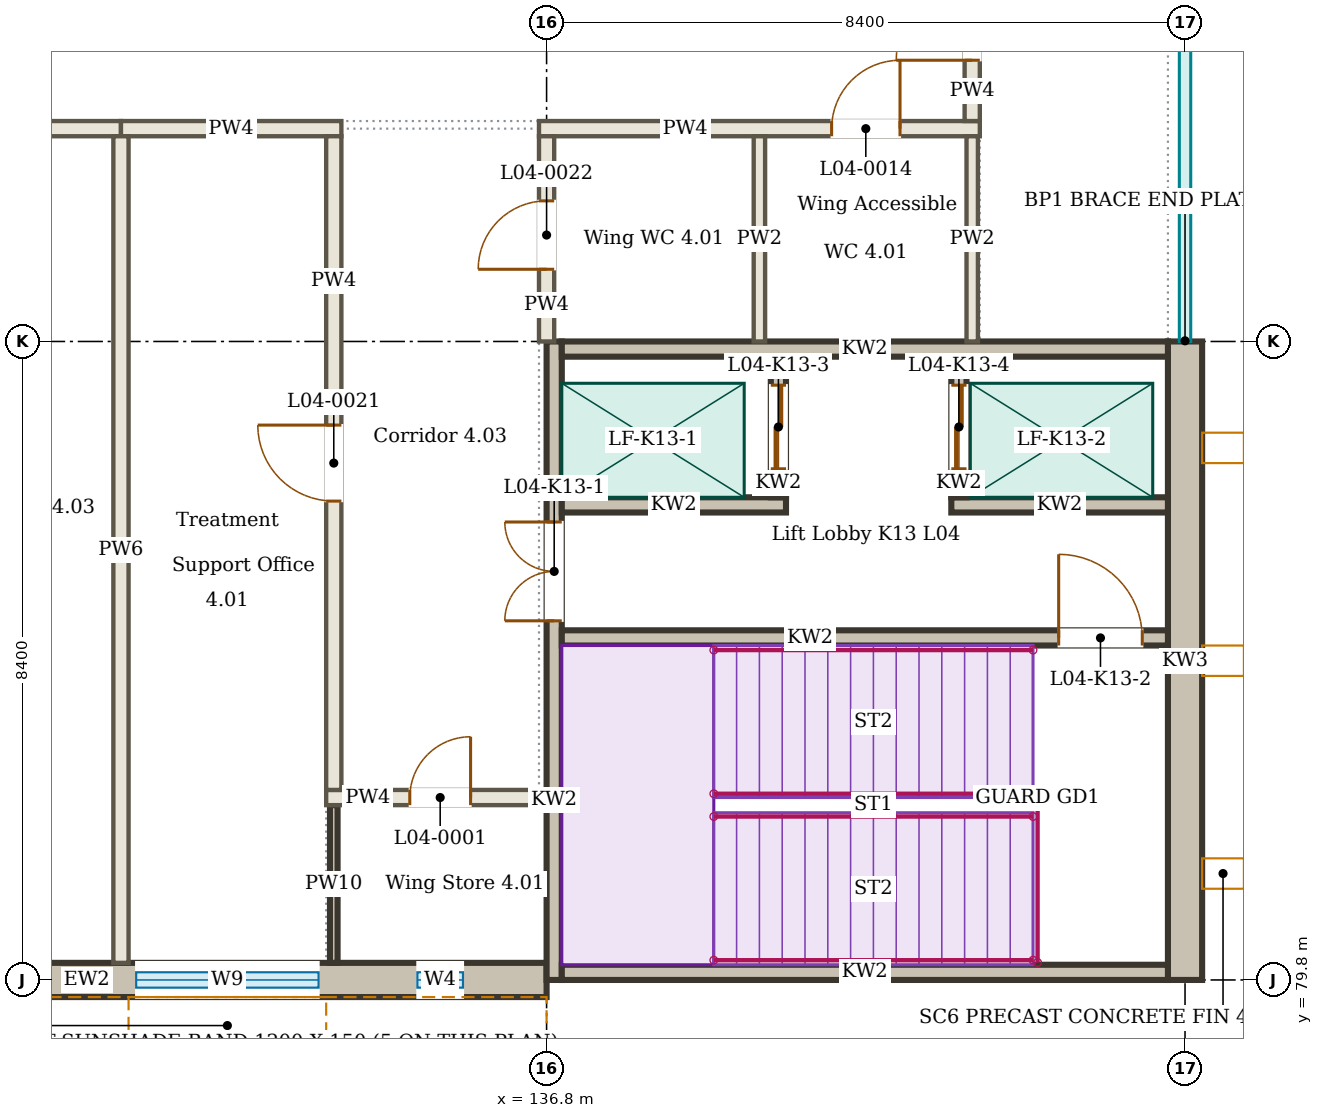
"""IFC4 building model, lengths in metres.
Left out: names, types, materials, properties, quantities, classifications, styles, units other than length and angle.
Written with IfcOpenShell. Run it as: python <this file> out.ifc"""

import sys

from ifc_helpers import new_model, si_unit, direction, frame, frame_2d, origin, place, context, subcontext, project, spatial, rectangle, extrude, element, fill, save


model = new_model("IFC4")
c1 = context("Model", 3, precision=1e-05, world=origin(), true_north=direction((0.0, 1.0)))
c2 = subcontext(c1, "Body", "Model", "MODEL_VIEW")
j1 = project(units=[si_unit("LENGTHUNIT", "METRE"), si_unit("PLANEANGLEUNIT", "RADIAN")], contexts=[c1])
p1 = place(None, origin())
s1 = spatial("IfcSite", under=j1, at=p1, CompositionType="ELEMENT")
p2 = place(p1, origin())
s2 = spatial("IfcBuilding", under=s1, at=p2, CompositionType="ELEMENT")
p3 = place(p2, frame((0.0, 0.0, 18.0)))
s3 = spatial("IfcBuildingStorey", under=s2, at=p3, CompositionType="ELEMENT", Elevation=18.0)
p4 = place(p3, frame((128.597, 79.8, 0.0), z_axis=(0.0, 0.0, 1.0), x_axis=(1.0, 0.0, 0.0)))
e1 = element("IfcWall", 1, at=p4, inside=s3, PredefinedType="SOLIDWALL", context=c2, shape_type="SweptSolid", body=[
    extrude(rectangle(XDim=8.203, YDim=0.45, at=frame_2d((4.101, 0.0))), origin(), (0.0, 0.0, 1.0), 3.8),
])
p5 = place(p4, frame((0.903, 0.0, 2.1)))
e2 = element("IfcOpeningElement", 2, at=p5, cuts=e1, PredefinedType="OPENING", context=c2, shape_type="SweptSolid", body=[
    extrude(rectangle(XDim=0.6, YDim=1.2, at=frame_2d((0.3, 0.6))), frame((0.0, 0.235, 0.0), z_axis=(0.0, -1.0, 0.0), x_axis=(1.0, 0.0, 0.0)), (0.0, 0.0, 1.0), 0.47),
])
p6 = place(p4, frame((2.802, 0.0, 0.9)))
e3 = element("IfcOpeningElement", 3, at=p6, cuts=e1, PredefinedType="OPENING", context=c2, shape_type="SweptSolid", body=[
    extrude(rectangle(XDim=2.4, YDim=1.2, at=frame_2d((1.2, 0.6))), frame((0.0, 0.235, 0.0), z_axis=(0.0, -1.0, 0.0), x_axis=(1.0, 0.0, 0.0)), (0.0, 0.0, 1.0), 0.47),
])
p7 = place(p4, frame((6.502, 0.0, 2.1)))
e4 = element("IfcOpeningElement", 4, at=p7, cuts=e1, PredefinedType="OPENING", context=c2, shape_type="SweptSolid", body=[
    extrude(rectangle(XDim=0.6, YDim=1.2, at=frame_2d((0.3, 0.6))), frame((0.0, 0.235, 0.0), z_axis=(0.0, -1.0, 0.0), x_axis=(1.0, 0.0, 0.0)), (0.0, 0.0, 1.0), 0.47),
])
p8 = place(p3, frame((128.597, 79.64, 3.82), z_axis=(0.0, 0.0, 1.0), x_axis=(1.0, 0.0, 0.0)))
e5 = element("IfcWall", 5, at=p8, inside=s3, PredefinedType="SOLIDWALL", context=c2, shape_type="SweptSolid", body=[
    extrude(rectangle(XDim=8.203, YDim=0.13, at=frame_2d((4.101, 0.0))), origin(), (0.0, 0.0, 1.0), 0.68),
])
p9 = place(p3, frame((133.9, 82.2, 0.0), z_axis=(0.0, 0.0, 1.0), x_axis=(1.0, 0.0, 0.0)))
e6 = element("IfcWall", 6, at=p9, inside=s3, PredefinedType="PARTITIONING", context=c2, shape_type="SweptSolid", body=[
    extrude(rectangle(XDim=2.9, YDim=0.2, at=frame_2d((1.45, 0.0))), origin(), (0.0, 0.0, 1.0), 3.894),
])
p10 = place(p9, frame((1.1, 0.0, 0.0)))
e7 = element("IfcOpeningElement", 7, at=p10, cuts=e6, PredefinedType="OPENING", context=c2, shape_type="SweptSolid", body=[
    extrude(rectangle(XDim=0.8, YDim=2.1, at=frame_2d((0.4, 1.05))), frame((0.0, 0.11, 0.0), z_axis=(0.0, -1.0, 0.0), x_axis=(1.0, 0.0, 0.0)), (0.0, 0.0, 1.0), 0.22),
])
p11 = place(p3, frame((111.825, 91.0, 0.0), z_axis=(0.0, 0.0, 1.0), x_axis=(1.0, 0.0, 0.0)))
e8 = element("IfcWall", 8, at=p11, inside=s3, PredefinedType="PARTITIONING", context=c2, shape_type="SweptSolid", body=[
    extrude(rectangle(XDim=19.375, YDim=0.2, at=frame_2d((9.688, 0.0))), origin(), (0.0, 0.0, 1.0), 3.75),
])
p12 = place(p11, frame((3.375, 0.0, 0.0)))
e9 = element("IfcOpeningElement", 9, at=p12, cuts=e8, PredefinedType="OPENING", context=c2, shape_type="SweptSolid", body=[
    extrude(rectangle(XDim=1.2, YDim=2.1, at=frame_2d((0.6, 1.05))), frame((0.0, 0.11, 0.0), z_axis=(0.0, -1.0, 0.0), x_axis=(1.0, 0.0, 0.0)), (0.0, 0.0, 1.0), 0.22),
])
p13 = place(p11, frame((10.375, 0.0, 0.0)))
e10 = element("IfcOpeningElement", 10, at=p13, cuts=e8, PredefinedType="OPENING", context=c2, shape_type="SweptSolid", body=[
    extrude(rectangle(XDim=1.2, YDim=2.1, at=frame_2d((0.6, 1.05))), frame((0.0, 0.11, 0.0), z_axis=(0.0, -1.0, 0.0), x_axis=(1.0, 0.0, 0.0)), (0.0, 0.0, 1.0), 0.22),
])
p14 = place(p11, frame((15.975, 0.0, 0.0)))
e11 = element("IfcOpeningElement", 11, at=p14, cuts=e8, PredefinedType="OPENING", context=c2, shape_type="SweptSolid", body=[
    extrude(rectangle(XDim=1.2, YDim=2.1, at=frame_2d((0.6, 1.05))), frame((0.0, 0.11, 0.0), z_axis=(0.0, -1.0, 0.0), x_axis=(1.0, 0.0, 0.0)), (0.0, 0.0, 1.0), 0.22),
])
p15 = place(p3, frame((131.2, 91.0, 0.0), z_axis=(0.0, 0.0, 1.0), x_axis=(1.0, 0.0, 0.0)))
e12 = element("IfcWall", 12, at=p15, inside=s3, PredefinedType="PARTITIONING", context=c2, shape_type="SweptSolid", body=[
    extrude(rectangle(XDim=2.9, YDim=0.2, at=frame_2d((1.45, 0.0))), origin(), (0.0, 0.0, 1.0), 3.894),
])
p16 = place(p3, frame((136.7, 91.0, 0.0), z_axis=(0.0, 0.0, 1.0), x_axis=(1.0, 0.0, 0.0)))
e13 = element("IfcWall", 13, at=p16, inside=s3, PredefinedType="PARTITIONING", context=c2, shape_type="SweptSolid", body=[
    extrude(rectangle(XDim=5.8, YDim=0.2, at=frame_2d((2.9, 0.0))), origin(), (0.0, 0.0, 1.0), 3.75),
])
p17 = place(p16, frame((3.85, 0.0, 0.0)))
e14 = element("IfcOpeningElement", 14, at=p17, cuts=e13, PredefinedType="OPENING", context=c2, shape_type="SweptSolid", body=[
    extrude(rectangle(XDim=0.9, YDim=2.1, at=frame_2d((0.45, 1.05))), frame((0.0, 0.11, 0.0), z_axis=(0.0, -1.0, 0.0), x_axis=(1.0, 0.0, 0.0)), (0.0, 0.0, 1.0), 0.22),
])
p18 = place(p3, frame((131.2, 80.025, 0.0), z_axis=(0.0, 0.0, 1.0), x_axis=(0.0, 1.0, 0.0)))
e15 = element("IfcWall", 15, at=p18, inside=s3, PredefinedType="PARTITIONING", context=c2, shape_type="SweptSolid", body=[
    extrude(rectangle(XDim=10.875, YDim=0.2, at=frame_2d((5.438, 0.0))), origin(), (0.0, 0.0, 1.0), 3.75),
])
p19 = place(p3, frame((134.0, 80.025, 0.0), z_axis=(0.0, 0.0, 1.0), x_axis=(0.0, 1.0, 0.0)))
e16 = element("IfcWall", 16, at=p19, inside=s3, PredefinedType="SOLIDWALL", context=c2, shape_type="SweptSolid", body=[
    extrude(rectangle(XDim=2.075, YDim=0.1, at=frame_2d((1.038, 0.0))), origin(), (0.0, 0.0, 1.0), 3.894),
])
p20 = place(p3, frame((134.0, 82.3, 0.0), z_axis=(0.0, 0.0, 1.0), x_axis=(0.0, 1.0, 0.0)))
e17 = element("IfcWall", 17, at=p20, inside=s3, PredefinedType="PARTITIONING", context=c2, shape_type="SweptSolid", body=[
    extrude(rectangle(XDim=8.6, YDim=0.2, at=frame_2d((4.3, 0.0))), origin(), (0.0, 0.0, 1.0), 3.75),
])
p21 = place(p20, frame((3.8, 0.0, 0.0)))
e18 = element("IfcOpeningElement", 18, at=p21, cuts=e17, PredefinedType="OPENING", context=c2, shape_type="SweptSolid", body=[
    extrude(rectangle(XDim=1.0, YDim=2.1, at=frame_2d((0.5, 1.05))), frame((0.0, 0.11, 0.0), z_axis=(0.0, -1.0, 0.0), x_axis=(1.0, 0.0, 0.0)), (0.0, 0.0, 1.0), 0.22),
])
p22 = place(p3, frame((136.8, 88.2, 0.0), z_axis=(0.0, 0.0, 1.0), x_axis=(0.0, 1.0, 0.0)))
e19 = element("IfcWall", 19, at=p22, inside=s3, PredefinedType="PARTITIONING", context=c2, shape_type="SweptSolid", body=[
    extrude(rectangle(XDim=2.7, YDim=0.2, at=frame_2d((1.35, 0.0))), origin(), (0.0, 0.0, 1.0), 3.75),
])
p23 = place(p22, frame((0.95, 0.0, 0.0)))
e20 = element("IfcOpeningElement", 20, at=p23, cuts=e19, PredefinedType="OPENING", context=c2, shape_type="SweptSolid", body=[
    extrude(rectangle(XDim=0.9, YDim=2.1, at=frame_2d((0.45, 1.05))), frame((0.0, 0.11, 0.0), z_axis=(0.0, -1.0, 0.0), x_axis=(1.0, 0.0, 0.0)), (0.0, 0.0, 1.0), 0.22),
])
for number, where, z_axis, x_axis in (
    (21, (139.6, 88.2, 0.0), (0.0, 0.0, 1.0), (0.0, 1.0, 0.0)),
    (22, (142.4, 88.2, 0.0), (0.0, 0.0, 1.0), (0.0, 1.0, 0.0)),
):
    element("IfcWall", number, at=place(p3, frame(where, z_axis=z_axis, x_axis=x_axis)), inside=s3, PredefinedType="PARTITIONING", context=c2, shape_type="SweptSolid", body=[
        extrude(rectangle(XDim=2.7, YDim=0.15, at=frame_2d((1.35, 0.0))), origin(), (0.0, 0.0, 1.0), 3.894),
    ])
p24 = place(p3, frame((142.4, 91.1, 0.0), z_axis=(0.0, 0.0, 1.0), x_axis=(0.0, 1.0, 0.0)))
e23 = element("IfcWall", 23, at=p24, inside=s3, PredefinedType="PARTITIONING", context=c2, shape_type="SweptSolid", body=[
    extrude(rectangle(XDim=2.6, YDim=0.2, at=frame_2d((1.3, 0.0))), origin(), (0.0, 0.0, 1.0), 3.894),
])
p25 = place(p24, frame((0.8, 0.0, 0.0)))
e24 = element("IfcOpeningElement", 24, at=p25, cuts=e23, PredefinedType="OPENING", context=c2, shape_type="SweptSolid", body=[
    extrude(rectangle(XDim=1.0, YDim=2.1, at=frame_2d((0.5, 1.05))), frame((0.0, 0.11, 0.0), z_axis=(0.0, -1.0, 0.0), x_axis=(1.0, 0.0, 0.0)), (0.0, 0.0, 1.0), 0.22),
])
p26 = place(p3, frame((136.9, 79.8, 0.0), z_axis=(0.0, 0.0, 1.0), x_axis=(0.0, 1.0, 0.0)))
e25 = element("IfcWall", 25, at=p26, inside=s3, PredefinedType="SOLIDWALL", context=c2, shape_type="SweptSolid", body=[
    extrude(rectangle(XDim=8.4, YDim=0.2, at=frame_2d((4.2, 0.0))), origin(), (0.0, 0.0, 1.0), 4.5),
])
p27 = place(p26, frame((4.725, 0.0, 0.0)))
e26 = element("IfcOpeningElement", 26, at=p27, cuts=e25, PredefinedType="OPENING", context=c2, shape_type="SweptSolid", body=[
    extrude(rectangle(XDim=1.3, YDim=2.1, at=frame_2d((0.65, 1.05))), frame((0.0, 0.11, 0.0), z_axis=(0.0, -1.0, 0.0), x_axis=(1.0, 0.0, 0.0)), (0.0, 0.0, 1.0), 0.22),
])
p28 = place(p3, frame((145.2, 79.8, 0.0), z_axis=(0.0, 0.0, 1.0), x_axis=(0.0, 1.0, 0.0)))
e27 = element("IfcWall", 27, at=p28, inside=s3, PredefinedType="SOLIDWALL", context=c2, shape_type="SweptSolid", body=[
    extrude(rectangle(XDim=8.4, YDim=0.45, at=frame_2d((4.2, 0.0))), origin(), (0.0, 0.0, 1.0), 4.5),
])
for number, where, z_axis, x_axis in (
    (28, (137.0, 79.9, 0.0), (0.0, 0.0, 1.0), (1.0, 0.0, 0.0)),
    (29, (137.0, 88.1, 0.0), (0.0, 0.0, 1.0), (1.0, 0.0, 0.0)),
):
    element("IfcWall", number, at=place(p3, frame(where, z_axis=z_axis, x_axis=x_axis)), inside=s3, PredefinedType="SOLIDWALL", context=c2, shape_type="SweptSolid", body=[
        extrude(rectangle(XDim=7.975, YDim=0.2, at=frame_2d((3.988, 0.0))), origin(), (0.0, 0.0, 1.0), 4.5),
    ])
p29 = place(p3, frame((137.0, 84.3, 0.0), z_axis=(0.0, 0.0, 1.0), x_axis=(1.0, 0.0, 0.0)))
e30 = element("IfcWall", 30, at=p29, inside=s3, PredefinedType="SOLIDWALL", context=c2, shape_type="SweptSolid", body=[
    extrude(rectangle(XDim=7.975, YDim=0.2, at=frame_2d((3.988, 0.0))), origin(), (0.0, 0.0, 1.0), 4.5),
])
p30 = place(p29, frame((6.538, 0.0, 0.0)))
e31 = element("IfcOpeningElement", 31, at=p30, cuts=e30, PredefinedType="OPENING", context=c2, shape_type="SweptSolid", body=[
    extrude(rectangle(XDim=1.1, YDim=2.1, at=frame_2d((0.55, 1.05))), frame((0.0, 0.11, 0.0), z_axis=(0.0, -1.0, 0.0), x_axis=(1.0, 0.0, 0.0)), (0.0, 0.0, 1.0), 0.22),
])
p31 = place(p3, frame((137.0, 86.05, 0.0), z_axis=(0.0, 0.0, 1.0), x_axis=(1.0, 0.0, 0.0)))
e32 = element("IfcWall", 32, at=p31, inside=s3, PredefinedType="SOLIDWALL", context=c2, shape_type="SweptSolid", body=[
    extrude(rectangle(XDim=2.95, YDim=0.2, at=frame_2d((1.475, 0.0))), origin(), (0.0, 0.0, 1.0), 4.5),
])
p32 = place(p3, frame((142.125, 86.05, 0.0), z_axis=(0.0, 0.0, 1.0), x_axis=(1.0, 0.0, 0.0)))
e33 = element("IfcWall", 33, at=p32, inside=s3, PredefinedType="SOLIDWALL", context=c2, shape_type="SweptSolid", body=[
    extrude(rectangle(XDim=2.85, YDim=0.2, at=frame_2d((1.425, 0.0))), origin(), (0.0, 0.0, 1.0), 4.5),
])
p33 = place(p3, frame((139.85, 86.15, 0.0), z_axis=(0.0, 0.0, 1.0), x_axis=(0.0, 1.0, 0.0)))
e34 = element("IfcWall", 34, at=p33, inside=s3, PredefinedType="SOLIDWALL", context=c2, shape_type="SweptSolid", body=[
    extrude(rectangle(XDim=1.85, YDim=0.2, at=frame_2d((0.925, 0.0))), origin(), (0.0, 0.0, 1.0), 4.5),
])
p34 = place(p33, frame((0.375, 0.0, 0.0)))
e35 = element("IfcOpeningElement", 35, at=p34, cuts=e34, PredefinedType="OPENING", context=c2, shape_type="SweptSolid", body=[
    extrude(rectangle(XDim=1.1, YDim=2.1, at=frame_2d((0.55, 1.05))), frame((0.0, 0.11, 0.0), z_axis=(0.0, -1.0, 0.0), x_axis=(1.0, 0.0, 0.0)), (0.0, 0.0, 1.0), 0.22),
])
p35 = place(p3, frame((142.225, 86.15, 0.0), z_axis=(0.0, 0.0, 1.0), x_axis=(0.0, 1.0, 0.0)))
e36 = element("IfcWall", 36, at=p35, inside=s3, PredefinedType="SOLIDWALL", context=c2, shape_type="SweptSolid", body=[
    extrude(rectangle(XDim=1.85, YDim=0.2, at=frame_2d((0.925, 0.0))), origin(), (0.0, 0.0, 1.0), 4.5),
])
p36 = place(p35, frame((0.375, 0.0, 0.0)))
e37 = element("IfcOpeningElement", 37, at=p36, cuts=e36, PredefinedType="OPENING", context=c2, shape_type="SweptSolid", body=[
    extrude(rectangle(XDim=1.1, YDim=2.1, at=frame_2d((0.55, 1.05))), frame((0.0, 0.11, 0.0), z_axis=(0.0, -1.0, 0.0), x_axis=(1.0, 0.0, 0.0)), (0.0, 0.0, 1.0), 0.22),
])
p37 = place(p6, origin())
e38 = element("IfcWindow", 38, at=p37, inside=s3, PartitioningType="SINGLE_PANEL", PredefinedType="WINDOW", context=c2, shape_type="SweptSolid", body=[
    extrude(rectangle(XDim=2.4, YDim=1.2, at=frame_2d((1.2, 0.6))), frame((0.0, 0.03, 0.0), z_axis=(0.0, -1.0, 0.0), x_axis=(1.0, 0.0, 0.0)), (0.0, 0.0, 1.0), 0.06),
])
fill(e3, e38)
p38 = place(p7, origin())
e39 = element("IfcWindow", 39, at=p38, inside=s3, PartitioningType="SINGLE_PANEL", PredefinedType="WINDOW", context=c2, shape_type="SweptSolid", body=[
    extrude(rectangle(XDim=0.6, YDim=1.2, at=frame_2d((0.3, 0.6))), frame((0.0, 0.135, 0.0), z_axis=(0.0, -1.0, 0.0), x_axis=(1.0, 0.0, 0.0)), (0.0, 0.0, 1.0), 0.06),
])
fill(e4, e39)
p39 = place(p10, origin())
e40 = element("IfcDoor", 40, at=p39, inside=s3, OperationType="SINGLE_SWING_RIGHT", PredefinedType="DOOR", context=c2, shape_type="SweptSolid", body=[
    extrude(rectangle(XDim=0.8, YDim=2.1, at=frame_2d((0.4, 1.05))), frame((0.0, 0.025, 0.0), z_axis=(0.0, -1.0, 0.0), x_axis=(1.0, 0.0, 0.0)), (0.0, 0.0, 1.0), 0.05),
])
fill(e7, e40)
p40 = place(p17, origin())
e41 = element("IfcDoor", 41, at=p40, inside=s3, OperationType="SINGLE_SWING_RIGHT", PredefinedType="DOOR", context=c2, shape_type="SweptSolid", body=[
    extrude(rectangle(XDim=0.9, YDim=2.1, at=frame_2d((0.45, 1.05))), frame((0.0, 0.025, 0.0), z_axis=(0.0, -1.0, 0.0), x_axis=(1.0, 0.0, 0.0)), (0.0, 0.0, 1.0), 0.05),
])
fill(e14, e41)
p41 = place(p21, origin())
e42 = element("IfcDoor", 42, at=p41, inside=s3, OperationType="SINGLE_SWING_RIGHT", PredefinedType="DOOR", context=c2, shape_type="SweptSolid", body=[
    extrude(rectangle(XDim=1.0, YDim=2.1, at=frame_2d((0.5, 1.05))), frame((0.0, 0.025, 0.0), z_axis=(0.0, -1.0, 0.0), x_axis=(1.0, 0.0, 0.0)), (0.0, 0.0, 1.0), 0.05),
])
fill(e18, e42)
p42 = place(p23, origin())
e43 = element("IfcDoor", 43, at=p42, inside=s3, OperationType="SINGLE_SWING_LEFT", PredefinedType="DOOR", context=c2, shape_type="SweptSolid", body=[
    extrude(rectangle(XDim=0.9, YDim=2.1, at=frame_2d((0.45, 1.05))), frame((0.0, 0.025, 0.0), z_axis=(0.0, -1.0, 0.0), x_axis=(1.0, 0.0, 0.0)), (0.0, 0.0, 1.0), 0.05),
])
fill(e20, e43)
p43 = place(p25, origin())
e44 = element("IfcDoor", 44, at=p43, inside=s3, OperationType="SINGLE_SWING_LEFT", PredefinedType="DOOR", context=c2, shape_type="SweptSolid", body=[
    extrude(rectangle(XDim=1.0, YDim=2.1, at=frame_2d((0.5, 1.05))), frame((0.0, 0.025, 0.0), z_axis=(0.0, -1.0, 0.0), x_axis=(1.0, 0.0, 0.0)), (0.0, 0.0, 1.0), 0.05),
])
fill(e24, e44)
p44 = place(p27, origin())
e45 = element("IfcDoor", 45, at=p44, inside=s3, OperationType="DOUBLE_DOOR_DOUBLE_SWING", PredefinedType="DOOR", context=c2, shape_type="SweptSolid", body=[
    extrude(rectangle(XDim=1.3, YDim=2.1, at=frame_2d((0.65, 1.05))), frame((0.0, 0.025, 0.0), z_axis=(0.0, -1.0, 0.0), x_axis=(1.0, 0.0, 0.0)), (0.0, 0.0, 1.0), 0.05),
])
fill(e26, e45)
p45 = place(p30, origin())
e46 = element("IfcDoor", 46, at=p45, inside=s3, OperationType="SINGLE_SWING_LEFT", PredefinedType="DOOR", context=c2, shape_type="SweptSolid", body=[
    extrude(rectangle(XDim=1.1, YDim=2.1, at=frame_2d((0.55, 1.05))), frame((0.0, 0.025, 0.0), z_axis=(0.0, -1.0, 0.0), x_axis=(1.0, 0.0, 0.0)), (0.0, 0.0, 1.0), 0.05),
])
fill(e31, e46)
p46 = place(p34, origin())
e47 = element("IfcDoor", 47, at=p46, inside=s3, OperationType="DOUBLE_DOOR_SLIDING", PredefinedType="DOOR", context=c2, shape_type="SweptSolid", body=[
    extrude(rectangle(XDim=1.1, YDim=2.1, at=frame_2d((0.55, 1.05))), frame((0.0, 0.025, 0.0), z_axis=(0.0, -1.0, 0.0), x_axis=(1.0, 0.0, 0.0)), (0.0, 0.0, 1.0), 0.05),
])
fill(e35, e47)
p47 = place(p36, origin())
e48 = element("IfcDoor", 48, at=p47, inside=s3, OperationType="DOUBLE_DOOR_SLIDING", PredefinedType="DOOR", context=c2, shape_type="SweptSolid", body=[
    extrude(rectangle(XDim=1.1, YDim=2.1, at=frame_2d((0.55, 1.05))), frame((0.0, 0.025, 0.0), z_axis=(0.0, -1.0, 0.0), x_axis=(1.0, 0.0, 0.0)), (0.0, 0.0, 1.0), 0.05),
])
fill(e37, e48)
save(model, sys.argv[1])
